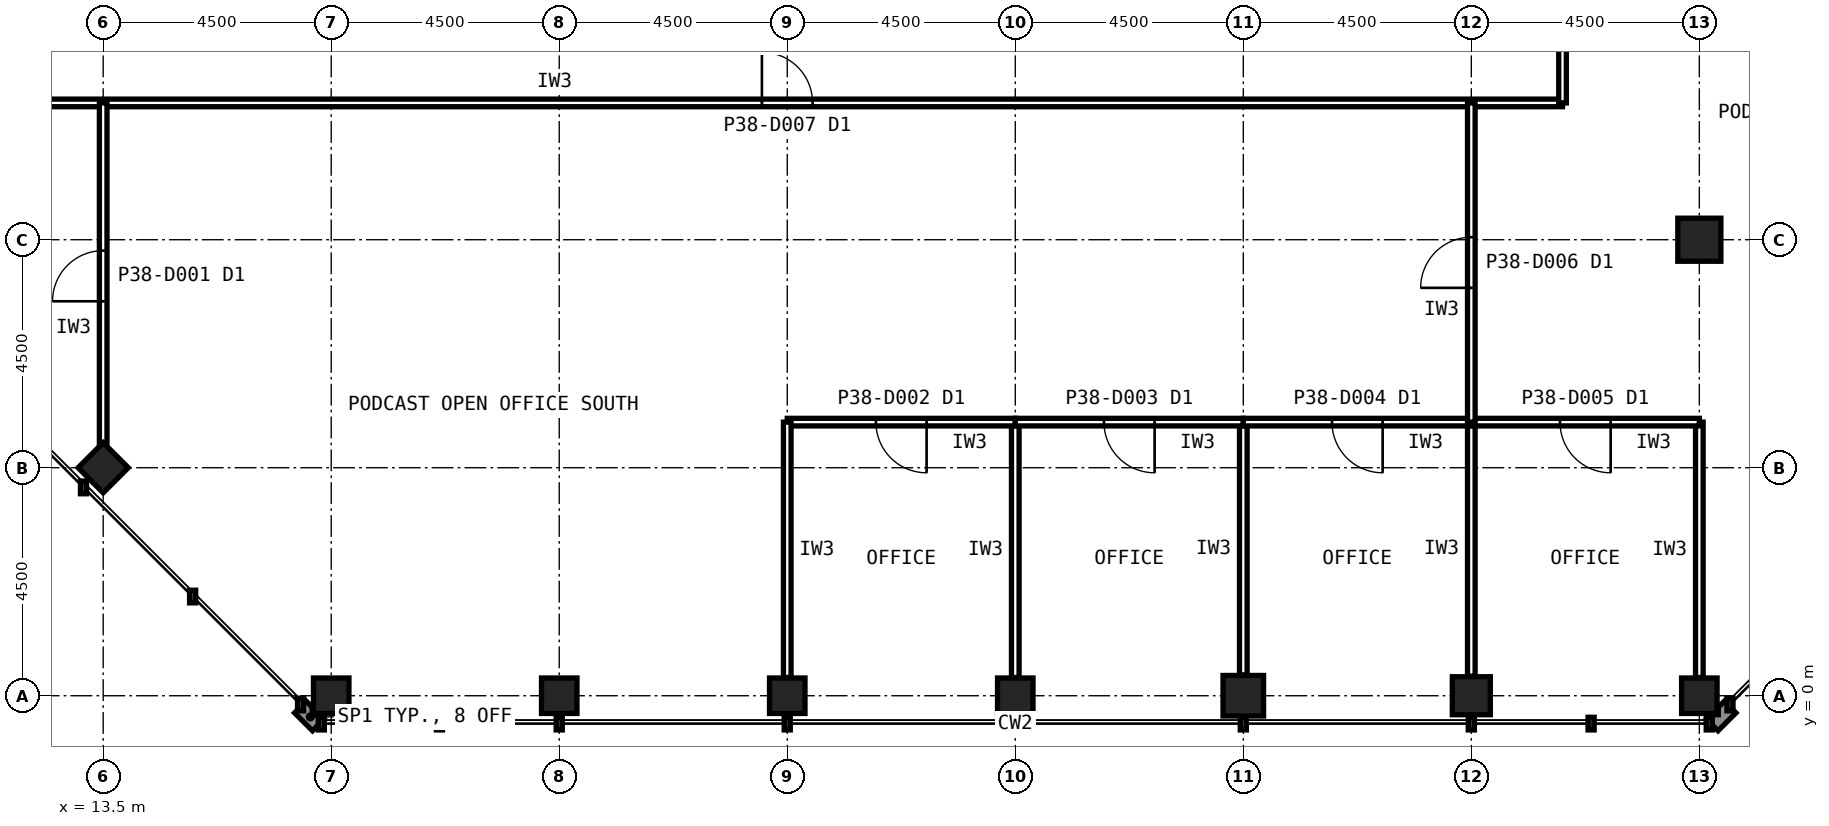
"""IFC4 building model, lengths in metres.
Left out: names, types, materials, properties, quantities, classifications, styles, units other than length and angle.
Written with IfcOpenShell. Run it as: python <this file> out.ifc"""

import sys

from ifc_helpers import new_model, si_unit, direction, frame, frame_2d, origin, origin_2d, place, context, subcontext, project, spatial, rectangle, hollow_rectangle, extrude, element, fill, save


model = new_model("IFC4")
c1 = context("Model", 3, precision=1e-05, world=origin(), true_north=direction((0.0, 1.0)))
c2 = subcontext(c1, "Body", "Model", "MODEL_VIEW")
j1 = project(units=[si_unit("LENGTHUNIT", "METRE"), si_unit("PLANEANGLEUNIT", "RADIAN")], contexts=[c1])
p1 = place(None, origin())
s1 = spatial("IfcSite", under=j1, at=p1, CompositionType="ELEMENT")
p2 = place(p1, origin())
s2 = spatial("IfcBuilding", under=s1, at=p2, CompositionType="ELEMENT")
p3 = place(p2, frame((0.0, 0.0, 159.6)))
s3 = spatial("IfcBuildingStorey", under=s2, at=p3, CompositionType="ELEMENT", Elevation=159.6)
for number, where, z_axis, x_axis in (
    (1, (18.0, 0.0, 0.0), (0.0, 0.0, 1.0), (1.0, 0.0, 0.0)),
    (2, (22.5, 0.0, 0.0), (0.0, 0.0, 1.0), (1.0, 0.0, 0.0)),
    (3, (27.0, 0.0, 0.0), (0.0, 0.0, 1.0), (1.0, 0.0, 0.0)),
    (4, (31.5, 0.0, 0.0), (0.0, 0.0, 1.0), (1.0, 0.0, 0.0)),
):
    element("IfcColumn", number, at=place(p3, frame(where, z_axis=z_axis, x_axis=x_axis)), inside=s3, PredefinedType="COLUMN", context=c2, shape_type="SweptSolid", body=[
        extrude(hollow_rectangle(XDim=0.7, YDim=0.7, WallThickness=0.036, at=origin_2d()), origin(), (0.0, 0.0, 1.0), 4.0),
    ])
p4 = place(p3, frame((36.0, 0.0, 0.0), z_axis=(0.0, 0.0, 1.0), x_axis=(1.0, 0.0, 0.0)))
e5 = element("IfcColumn", 5, at=p4, inside=s3, PredefinedType="COLUMN", context=c2, shape_type="SweptSolid", body=[
    extrude(hollow_rectangle(XDim=0.8, YDim=0.8, WallThickness=0.045, at=origin_2d()), origin(), (0.0, 0.0, 1.0), 4.0),
])
p5 = place(p3, frame((40.5, 0.0, 0.0), z_axis=(0.0, 0.0, 1.0), x_axis=(1.0, 0.0, 0.0)))
e6 = element("IfcColumn", 6, at=p5, inside=s3, PredefinedType="COLUMN", context=c2, shape_type="SweptSolid", body=[
    extrude(hollow_rectangle(XDim=0.75, YDim=0.75, WallThickness=0.04, at=origin_2d()), origin(), (0.0, 0.0, 1.0), 4.0),
])
for number, where, z_axis, x_axis in (
    (7, (45.0, 0.0, 0.0), (0.0, 0.0, 1.0), (1.0, 0.0, 0.0)),
    (8, (13.5, 4.5, 0.0), (0.0, 0.0, 1.0), (0.707, 0.707, 0.0)),
):
    element("IfcColumn", number, at=place(p3, frame(where, z_axis=z_axis, x_axis=x_axis)), inside=s3, PredefinedType="COLUMN", context=c2, shape_type="SweptSolid", body=[
        extrude(hollow_rectangle(XDim=0.7, YDim=0.7, WallThickness=0.036, at=origin_2d()), origin(), (0.0, 0.0, 1.0), 4.0),
    ])
p6 = place(p3, frame((45.0, 9.0, 0.0), z_axis=(0.0, 0.0, 1.0), x_axis=(1.0, 0.0, 0.0)))
e9 = element("IfcColumn", 9, at=p6, inside=s3, PredefinedType="COLUMN", context=c2, shape_type="SweptSolid", body=[
    extrude(hollow_rectangle(XDim=0.85, YDim=0.85, WallThickness=0.05, at=origin_2d()), origin(), (0.0, 0.0, 1.0), 4.0),
])
p7 = place(p3, frame((11.7, 11.7, 0.0), z_axis=(0.0, 0.0, 1.0), x_axis=(1.0, 0.0, 0.0)))
e10 = element("IfcWall", 10, at=p7, inside=s3, PredefinedType="PARTITIONING", context=c2, shape_type="SweptSolid", body=[
    extrude(rectangle(XDim=30.6, YDim=0.15, at=frame_2d((15.3, 0.0))), origin(), (0.0, 0.0, 1.0), 3.84),
])
p8 = place(p7, frame((14.8, 0.0, 0.0)))
e11 = element("IfcOpeningElement", 11, at=p8, cuts=e10, PredefinedType="OPENING", context=c2, shape_type="SweptSolid", body=[
    extrude(rectangle(XDim=1.0, YDim=2.1, at=frame_2d((0.5, 1.05))), frame((0.0, 0.085, 0.0), z_axis=(0.0, -1.0, 0.0), x_axis=(1.0, 0.0, 0.0)), (0.0, 0.0, 1.0), 0.17),
])
p9 = place(p3, frame((42.3, 11.7, 0.0), z_axis=(0.0, 0.0, 1.0), x_axis=(0.0, 1.0, 0.0)))
e12 = element("IfcWall", 12, at=p9, inside=s3, PredefinedType="PARTITIONING", context=c2, shape_type="SweptSolid", body=[
    extrude(rectangle(XDim=9.0, YDim=0.15, at=frame_2d((4.5, 0.0))), origin(), (0.0, 0.0, 1.0), 3.84),
])
p10 = place(p3, frame((31.5, 0.36, 0.0), z_axis=(0.0, 0.0, 1.0), x_axis=(0.0, 1.0, 0.0)))
e13 = element("IfcWall", 13, at=p10, inside=s3, PredefinedType="PARTITIONING", context=c2, shape_type="SweptSolid", body=[
    extrude(rectangle(XDim=5.04, YDim=0.15, at=frame_2d((2.52, 0.0))), origin(), (0.0, 0.0, 1.0), 2.989),
])
p11 = place(p3, frame((31.5, 5.4, 0.0), z_axis=(0.0, 0.0, 1.0), x_axis=(-1.0, 0.0, 0.0)))
e14 = element("IfcWall", 14, at=p11, inside=s3, PredefinedType="PARTITIONING", context=c2, shape_type="SweptSolid", body=[
    extrude(rectangle(XDim=4.5, YDim=0.15, at=frame_2d((2.25, 0.0))), origin(), (0.0, 0.0, 1.0), 3.84),
])
p12 = place(p11, frame((1.75, 0.0, 0.0)))
e15 = element("IfcOpeningElement", 15, at=p12, cuts=e14, PredefinedType="OPENING", context=c2, shape_type="SweptSolid", body=[
    extrude(rectangle(XDim=1.0, YDim=2.1, at=frame_2d((0.5, 1.05))), frame((0.0, 0.085, 0.0), z_axis=(0.0, -1.0, 0.0), x_axis=(1.0, 0.0, 0.0)), (0.0, 0.0, 1.0), 0.17),
])
p13 = place(p3, frame((27.0, 5.4, 0.0), z_axis=(0.0, 0.0, 1.0), x_axis=(0.0, -1.0, 0.0)))
e16 = element("IfcWall", 16, at=p13, inside=s3, PredefinedType="PARTITIONING", context=c2, shape_type="SweptSolid", body=[
    extrude(rectangle(XDim=5.04, YDim=0.15, at=frame_2d((2.52, 0.0))), origin(), (0.0, 0.0, 1.0), 2.989),
])
p14 = place(p3, frame((36.0, 0.41, 0.0), z_axis=(0.0, 0.0, 1.0), x_axis=(0.0, 1.0, 0.0)))
e17 = element("IfcWall", 17, at=p14, inside=s3, PredefinedType="PARTITIONING", context=c2, shape_type="SweptSolid", body=[
    extrude(rectangle(XDim=4.99, YDim=0.15, at=frame_2d((2.495, 0.0))), origin(), (0.0, 0.0, 1.0), 2.989),
])
p15 = place(p3, frame((36.0, 5.4, 0.0), z_axis=(0.0, 0.0, 1.0), x_axis=(-1.0, 0.0, 0.0)))
e18 = element("IfcWall", 18, at=p15, inside=s3, PredefinedType="PARTITIONING", context=c2, shape_type="SweptSolid", body=[
    extrude(rectangle(XDim=4.5, YDim=0.15, at=frame_2d((2.25, 0.0))), origin(), (0.0, 0.0, 1.0), 3.84),
])
p16 = place(p15, frame((1.75, 0.0, 0.0)))
e19 = element("IfcOpeningElement", 19, at=p16, cuts=e18, PredefinedType="OPENING", context=c2, shape_type="SweptSolid", body=[
    extrude(rectangle(XDim=1.0, YDim=2.1, at=frame_2d((0.5, 1.05))), frame((0.0, 0.085, 0.0), z_axis=(0.0, -1.0, 0.0), x_axis=(1.0, 0.0, 0.0)), (0.0, 0.0, 1.0), 0.17),
])
p17 = place(p3, frame((40.5, 0.385, 0.0), z_axis=(0.0, 0.0, 1.0), x_axis=(0.0, 1.0, 0.0)))
e20 = element("IfcWall", 20, at=p17, inside=s3, PredefinedType="PARTITIONING", context=c2, shape_type="SweptSolid", body=[
    extrude(rectangle(XDim=5.015, YDim=0.15, at=frame_2d((2.507, 0.0))), origin(), (0.0, 0.0, 1.0), 2.989),
])
p18 = place(p3, frame((40.5, 5.4, 0.0), z_axis=(0.0, 0.0, 1.0), x_axis=(-1.0, 0.0, 0.0)))
e21 = element("IfcWall", 21, at=p18, inside=s3, PredefinedType="PARTITIONING", context=c2, shape_type="SweptSolid", body=[
    extrude(rectangle(XDim=4.5, YDim=0.15, at=frame_2d((2.25, 0.0))), origin(), (0.0, 0.0, 1.0), 3.84),
])
p19 = place(p18, frame((1.75, 0.0, 0.0)))
e22 = element("IfcOpeningElement", 22, at=p19, cuts=e21, PredefinedType="OPENING", context=c2, shape_type="SweptSolid", body=[
    extrude(rectangle(XDim=1.0, YDim=2.1, at=frame_2d((0.5, 1.05))), frame((0.0, 0.085, 0.0), z_axis=(0.0, -1.0, 0.0), x_axis=(1.0, 0.0, 0.0)), (0.0, 0.0, 1.0), 0.17),
])
p20 = place(p3, frame((45.0, 0.36, 0.0), z_axis=(0.0, 0.0, 1.0), x_axis=(0.0, 1.0, 0.0)))
e23 = element("IfcWall", 23, at=p20, inside=s3, PredefinedType="PARTITIONING", context=c2, shape_type="SweptSolid", body=[
    extrude(rectangle(XDim=5.04, YDim=0.15, at=frame_2d((2.52, 0.0))), origin(), (0.0, 0.0, 1.0), 3.229),
])
p21 = place(p3, frame((45.0, 5.4, 0.0), z_axis=(0.0, 0.0, 1.0), x_axis=(-1.0, 0.0, 0.0)))
e24 = element("IfcWall", 24, at=p21, inside=s3, PredefinedType="PARTITIONING", context=c2, shape_type="SweptSolid", body=[
    extrude(rectangle(XDim=4.5, YDim=0.15, at=frame_2d((2.25, 0.0))), origin(), (0.0, 0.0, 1.0), 3.84),
])
p22 = place(p21, frame((1.75, 0.0, 0.0)))
e25 = element("IfcOpeningElement", 25, at=p22, cuts=e24, PredefinedType="OPENING", context=c2, shape_type="SweptSolid", body=[
    extrude(rectangle(XDim=1.0, YDim=2.1, at=frame_2d((0.5, 1.05))), frame((0.0, 0.085, 0.0), z_axis=(0.0, -1.0, 0.0), x_axis=(1.0, 0.0, 0.0)), (0.0, 0.0, 1.0), 0.17),
])
p23 = place(p3, frame((40.5, 5.4, 0.0), z_axis=(0.0, 0.0, 1.0), x_axis=(0.0, 1.0, 0.0)))
e26 = element("IfcWall", 26, at=p23, inside=s3, PredefinedType="PARTITIONING", context=c2, shape_type="SweptSolid", body=[
    extrude(rectangle(XDim=6.3, YDim=0.15, at=frame_2d((3.15, 0.0))), origin(), (0.0, 0.0, 1.0), 2.989),
])
p24 = place(p23, frame((2.65, 0.0, 0.0)))
e27 = element("IfcOpeningElement", 27, at=p24, cuts=e26, PredefinedType="OPENING", context=c2, shape_type="SweptSolid", body=[
    extrude(rectangle(XDim=1.0, YDim=2.1, at=frame_2d((0.5, 1.05))), frame((0.0, 0.085, 0.0), z_axis=(0.0, -1.0, 0.0), x_axis=(1.0, 0.0, 0.0)), (0.0, 0.0, 1.0), 0.17),
])
p25 = place(p3, frame((13.5, 4.87, 0.0), z_axis=(0.0, 0.0, 1.0), x_axis=(0.0, 1.0, 0.0)))
e28 = element("IfcWall", 28, at=p25, inside=s3, PredefinedType="PARTITIONING", context=c2, shape_type="SweptSolid", body=[
    extrude(rectangle(XDim=6.83, YDim=0.15, at=frame_2d((3.415, 0.0))), origin(), (0.0, 0.0, 1.0), 2.989),
])
p26 = place(p25, frame((2.915, 0.0, 0.0)))
e29 = element("IfcOpeningElement", 29, at=p26, cuts=e28, PredefinedType="OPENING", context=c2, shape_type="SweptSolid", body=[
    extrude(rectangle(XDim=1.0, YDim=2.1, at=frame_2d((0.5, 1.05))), frame((0.0, 0.085, 0.0), z_axis=(0.0, -1.0, 0.0), x_axis=(1.0, 0.0, 0.0)), (0.0, 0.0, 1.0), 0.17),
])
p27 = place(p8, origin())
e30 = element("IfcDoor", 30, at=p27, inside=s3, OperationType="SINGLE_SWING_LEFT", PredefinedType="DOOR", context=c2, shape_type="SweptSolid", body=[
    extrude(rectangle(XDim=1.0, YDim=2.1, at=frame_2d((0.5, 1.05))), frame((0.0, 0.025, 0.0), z_axis=(0.0, -1.0, 0.0), x_axis=(1.0, 0.0, 0.0)), (0.0, 0.0, 1.0), 0.05),
])
fill(e11, e30)
p28 = place(p12, origin())
e31 = element("IfcDoor", 31, at=p28, inside=s3, OperationType="SINGLE_SWING_LEFT", PredefinedType="DOOR", context=c2, shape_type="SweptSolid", body=[
    extrude(rectangle(XDim=1.0, YDim=2.1, at=frame_2d((0.5, 1.05))), frame((0.0, 0.025, 0.0), z_axis=(0.0, -1.0, 0.0), x_axis=(1.0, 0.0, 0.0)), (0.0, 0.0, 1.0), 0.05),
])
fill(e15, e31)
p29 = place(p16, origin())
e32 = element("IfcDoor", 32, at=p29, inside=s3, OperationType="SINGLE_SWING_LEFT", PredefinedType="DOOR", context=c2, shape_type="SweptSolid", body=[
    extrude(rectangle(XDim=1.0, YDim=2.1, at=frame_2d((0.5, 1.05))), frame((0.0, 0.025, 0.0), z_axis=(0.0, -1.0, 0.0), x_axis=(1.0, 0.0, 0.0)), (0.0, 0.0, 1.0), 0.05),
])
fill(e19, e32)
p30 = place(p19, origin())
e33 = element("IfcDoor", 33, at=p30, inside=s3, OperationType="SINGLE_SWING_LEFT", PredefinedType="DOOR", context=c2, shape_type="SweptSolid", body=[
    extrude(rectangle(XDim=1.0, YDim=2.1, at=frame_2d((0.5, 1.05))), frame((0.0, 0.025, 0.0), z_axis=(0.0, -1.0, 0.0), x_axis=(1.0, 0.0, 0.0)), (0.0, 0.0, 1.0), 0.05),
])
fill(e22, e33)
p31 = place(p22, origin())
e34 = element("IfcDoor", 34, at=p31, inside=s3, OperationType="SINGLE_SWING_LEFT", PredefinedType="DOOR", context=c2, shape_type="SweptSolid", body=[
    extrude(rectangle(XDim=1.0, YDim=2.1, at=frame_2d((0.5, 1.05))), frame((0.0, 0.025, 0.0), z_axis=(0.0, -1.0, 0.0), x_axis=(1.0, 0.0, 0.0)), (0.0, 0.0, 1.0), 0.05),
])
fill(e25, e34)
p32 = place(p24, origin())
e35 = element("IfcDoor", 35, at=p32, inside=s3, OperationType="SINGLE_SWING_LEFT", PredefinedType="DOOR", context=c2, shape_type="SweptSolid", body=[
    extrude(rectangle(XDim=1.0, YDim=2.1, at=frame_2d((0.5, 1.05))), frame((0.0, 0.025, 0.0), z_axis=(0.0, -1.0, 0.0), x_axis=(1.0, 0.0, 0.0)), (0.0, 0.0, 1.0), 0.05),
])
fill(e27, e35)
p33 = place(p26, origin())
e36 = element("IfcDoor", 36, at=p33, inside=s3, OperationType="SINGLE_SWING_LEFT", PredefinedType="DOOR", context=c2, shape_type="SweptSolid", body=[
    extrude(rectangle(XDim=1.0, YDim=2.1, at=frame_2d((0.5, 1.05))), frame((0.0, 0.025, 0.0), z_axis=(0.0, -1.0, 0.0), x_axis=(1.0, 0.0, 0.0)), (0.0, 0.0, 1.0), 0.05),
])
fill(e29, e36)
save(model, sys.argv[1])
